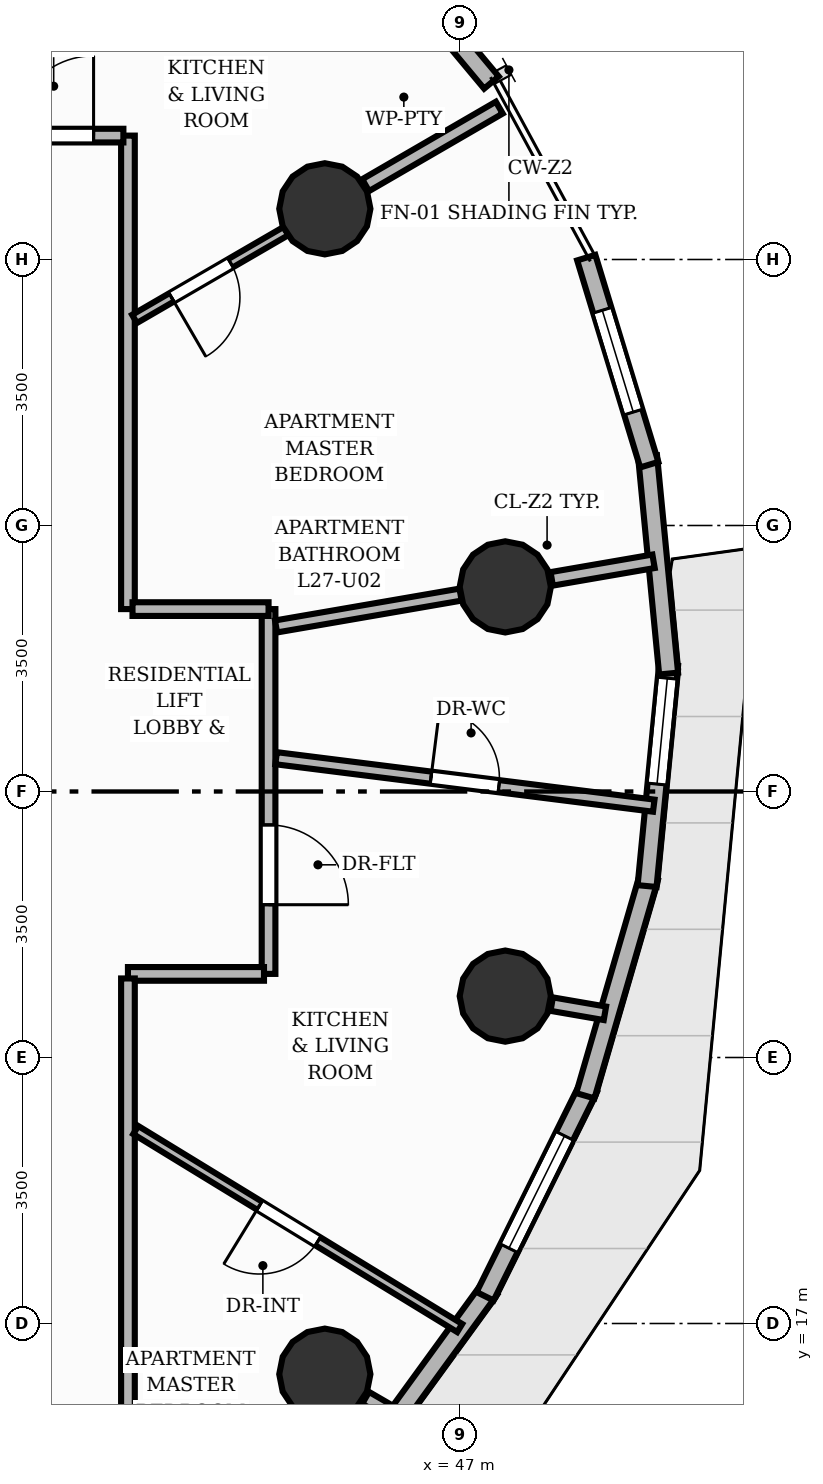
"""IFC4 building model, lengths in metres.
Left out: names, types, materials, properties, quantities, classifications, styles, units other than length and angle.
Written with IfcOpenShell. Run it as: python <this file> out.ifc"""

import sys

from ifc_helpers import new_model, si_unit, direction, frame, frame_2d, origin, origin_2d, place, context, subcontext, project, spatial, rectangle, circle, extrude, element, fill, save


model = new_model("IFC4")
c1 = context("Model", 3, precision=1e-05, world=origin(), true_north=direction((0.0, 1.0)))
c2 = subcontext(c1, "Body", "Model", "MODEL_VIEW")
j1 = project(units=[si_unit("LENGTHUNIT", "METRE"), si_unit("PLANEANGLEUNIT", "RADIAN")], contexts=[c1])
p1 = place(None, origin())
s1 = spatial("IfcSite", under=j1, at=p1, CompositionType="ELEMENT")
p2 = place(p1, origin())
s2 = spatial("IfcBuilding", under=s1, at=p2, CompositionType="ELEMENT")
p3 = place(p2, frame((0.0, 0.0, 93.28)))
s3 = spatial("IfcBuildingStorey", under=s2, at=p3, CompositionType="ELEMENT", Elevation=93.28)
for number, where, z_axis, x_axis in (
    (1, (47.594, 26.692, 0.0), (0.0, 0.0, 1.0), (1.0, 0.0, 0.0)),
    (2, (45.22, 31.667, 0.0), (0.0, 0.0, 1.0), (1.0, 0.0, 0.0)),
    (3, (45.22, 16.333, 0.0), (0.0, 0.0, 1.0), (1.0, 0.0, 0.0)),
    (4, (47.594, 21.308, 0.0), (0.0, 0.0, 1.0), (1.0, 0.0, 0.0)),
):
    element("IfcColumn", number, at=place(p3, frame(where, z_axis=z_axis, x_axis=x_axis)), inside=s3, PredefinedType="COLUMN", context=c2, shape_type="SweptSolid", body=[
        extrude(circle(Radius=0.6, at=origin_2d()), origin(), (0.0, 0.0, 1.0), 3.2),
    ])
p4 = place(p3, frame((45.572, 35.535, 0.0), z_axis=(0.0, 0.0, 1.0), x_axis=(0.640518566271, -0.76794268423, 0.0)))
e5 = element("IfcWall", 5, at=p4, inside=s3, PredefinedType="SOLIDWALL", context=c2, shape_type="SweptSolid", body=[
    extrude(rectangle(XDim=2.874, YDim=0.25, at=frame_2d((1.437, 0.0))), origin(), (0.0, 0.0, 1.0), 2.96),
])
p5 = place(p4, frame((0.612, 0.0, 0.85)))
e6 = element("IfcOpeningElement", 6, at=p5, cuts=e5, PredefinedType="OPENING", context=c2, shape_type="SweptSolid", body=[
    extrude(rectangle(XDim=1.65, YDim=1.55, at=frame_2d((0.825, 0.775))), frame((0.0, 0.135, 0.0), z_axis=(0.0, -1.0, 0.0), x_axis=(1.0, 0.0, 0.0)), (0.0, 0.0, 1.0), 0.27),
])
p6 = place(p3, frame((47.386, 17.453, 0.0), z_axis=(0.0, 0.0, 1.0), x_axis=(-0.588208785685, -0.808709109905, 0.0)))
e7 = element("IfcWall", 7, at=p6, inside=s3, PredefinedType="SOLIDWALL", context=c2, shape_type="SweptSolid", body=[
    extrude(rectangle(XDim=3.131, YDim=0.25, at=frame_2d((1.565, 0.0))), origin(), (0.0, 0.0, 1.0), 2.96),
])
p7 = place(p3, frame((48.688, 20.101, 0.0), z_axis=(0.0, 0.0, 1.0), x_axis=(-0.443988069997, -0.896032696781, 0.0)))
e8 = element("IfcWall", 8, at=p7, inside=s3, PredefinedType="SOLIDWALL", context=c2, shape_type="SweptSolid", body=[
    extrude(rectangle(XDim=3.061, YDim=0.25, at=frame_2d((1.53, 0.0))), origin(), (0.0, 0.0, 1.0), 2.96),
])
p8 = place(p7, frame((0.705, 0.0, 0.85)))
e9 = element("IfcOpeningElement", 9, at=p8, cuts=e8, PredefinedType="OPENING", context=c2, shape_type="SweptSolid", body=[
    extrude(rectangle(XDim=1.65, YDim=1.55, at=frame_2d((0.825, 0.775))), frame((0.0, 0.135, 0.0), z_axis=(0.0, -1.0, 0.0), x_axis=(1.0, 0.0, 0.0)), (0.0, 0.0, 1.0), 0.27),
])
p9 = place(p3, frame((49.481, 22.866, 0.0), z_axis=(0.0, 0.0, 1.0), x_axis=(-0.279152874041, -0.960246672952, 0.0)))
e10 = element("IfcWall", 10, at=p9, inside=s3, PredefinedType="SOLIDWALL", context=c2, shape_type="SweptSolid", body=[
    extrude(rectangle(XDim=2.989, YDim=0.25, at=frame_2d((1.494, 0.0))), origin(), (0.0, 0.0, 1.0), 2.96),
])
p10 = place(p3, frame((49.743, 25.665, 0.0), z_axis=(0.0, 0.0, 1.0), x_axis=(-0.096873982201, -0.995296655059, 0.0)))
e11 = element("IfcWall", 11, at=p10, inside=s3, PredefinedType="SOLIDWALL", context=c2, shape_type="SweptSolid", body=[
    extrude(rectangle(XDim=2.923, YDim=0.25, at=frame_2d((1.462, 0.0))), origin(), (0.0, 0.0, 1.0), 2.96),
])
p11 = place(p10, frame((0.175, 0.0, 0.85)))
e12 = element("IfcOpeningElement", 12, at=p11, cuts=e11, PredefinedType="OPENING", context=c2, shape_type="SweptSolid", body=[
    extrude(rectangle(XDim=1.4, YDim=1.55, at=frame_2d((0.7, 0.775))), frame((0.0, 0.135, 0.0), z_axis=(0.0, -1.0, 0.0), x_axis=(1.0, 0.0, 0.0)), (0.0, 0.0, 1.0), 0.27),
])
p12 = place(p3, frame((49.467, 28.412, 0.0), z_axis=(0.0, 0.0, 1.0), x_axis=(0.096332339466, -0.995349225334, 0.0)))
e13 = element("IfcWall", 13, at=p12, inside=s3, PredefinedType="SOLIDWALL", context=c2, shape_type="SweptSolid", body=[
    extrude(rectangle(XDim=2.874, YDim=0.25, at=frame_2d((1.437, 0.0))), origin(), (0.0, 0.0, 1.0), 2.96),
])
p13 = place(p3, frame((48.66, 31.024, 0.0), z_axis=(0.0, 0.0, 1.0), x_axis=(0.291144558409, -0.956679071637, 0.0)))
e14 = element("IfcWall", 14, at=p13, inside=s3, PredefinedType="SOLIDWALL", context=c2, shape_type="SweptSolid", body=[
    extrude(rectangle(XDim=2.848, YDim=0.25, at=frame_2d((1.424, 0.0))), origin(), (0.0, 0.0, 1.0), 2.96),
])
p14 = place(p13, frame((0.724, 0.0, 0.85)))
e15 = element("IfcOpeningElement", 15, at=p14, cuts=e14, PredefinedType="OPENING", context=c2, shape_type="SweptSolid", body=[
    extrude(rectangle(XDim=1.4, YDim=1.55, at=frame_2d((0.7, 0.775))), frame((0.0, 0.135, 0.0), z_axis=(0.0, -1.0, 0.0), x_axis=(1.0, 0.0, 0.0)), (0.0, 0.0, 1.0), 0.27),
])
p15 = place(p3, frame((48.206, 26.798, 0.0), z_axis=(0.0, 0.0, 1.0), x_axis=(0.98540615772, 0.170219576807, 0.0)))
e16 = element("IfcWall", 16, at=p15, inside=s3, PredefinedType="PARTITIONING", context=c2, shape_type="SweptSolid", body=[
    extrude(rectangle(XDim=1.36, YDim=0.18, at=frame_2d((0.68, 0.0))), origin(), (0.0, 0.0, 1.0), 2.26),
])
p16 = place(p3, frame((45.757, 31.978, 0.0), z_axis=(0.0, 0.0, 1.0), x_axis=(0.865025978628, 0.501727073516, 0.0)))
e17 = element("IfcWall", 17, at=p16, inside=s3, PredefinedType="PARTITIONING", context=c2, shape_type="SweptSolid", body=[
    extrude(rectangle(XDim=2.033, YDim=0.18, at=frame_2d((1.017, 0.0))), origin(), (0.0, 0.0, 1.0), 2.26),
])
p17 = place(p3, frame((45.757, 16.022, 0.0), z_axis=(0.0, 0.0, 1.0), x_axis=(0.864926134071, -0.501899175733, 0.0)))
e18 = element("IfcWall", 18, at=p17, inside=s3, PredefinedType="PARTITIONING", context=c2, shape_type="SweptSolid", body=[
    extrude(rectangle(XDim=0.424, YDim=0.18, at=frame_2d((0.212, 0.0))), origin(), (0.0, 0.0, 1.0), 2.26),
])
p18 = place(p3, frame((48.206, 21.202, 0.0), z_axis=(0.0, 0.0, 1.0), x_axis=(0.985420399327, -0.17013711115, 0.0)))
e19 = element("IfcWall", 19, at=p18, inside=s3, PredefinedType="PARTITIONING", context=c2, shape_type="SweptSolid", body=[
    extrude(rectangle(XDim=0.71, YDim=0.18, at=frame_2d((0.355, 0.0))), origin(), (0.0, 0.0, 1.0), 2.26),
])
p19 = place(p3, frame((44.48, 26.4, 0.0), z_axis=(0.0, 0.0, 1.0), x_axis=(0.0, -1.0, 0.0)))
e20 = element("IfcWall", 20, at=p19, inside=s3, PredefinedType="PARTITIONING", context=c2, shape_type="SweptSolid", body=[
    extrude(rectangle(XDim=4.8, YDim=0.18, at=frame_2d((2.4, 0.0))), origin(), (0.0, 0.0, 1.0), 2.955),
])
p20 = place(p19, frame((2.84, 0.0, 0.0)))
e21 = element("IfcOpeningElement", 21, at=p20, cuts=e20, PredefinedType="OPENING", context=c2, shape_type="SweptSolid", body=[
    extrude(rectangle(XDim=1.05, YDim=2.15, at=frame_2d((0.525, 1.075))), frame((0.0, 0.1, 0.0), z_axis=(0.0, -1.0, 0.0), x_axis=(1.0, 0.0, 0.0)), (0.0, 0.0, 1.0), 0.2),
])
p21 = place(p3, frame((44.42, 21.6, 0.0), z_axis=(0.0, 0.0, 1.0), x_axis=(-1.0, 0.0, 0.0)))
e22 = element("IfcWall", 22, at=p21, inside=s3, PredefinedType="PARTITIONING", context=c2, shape_type="SweptSolid", body=[
    extrude(rectangle(XDim=1.79, YDim=0.18, at=frame_2d((0.895, 0.0))), origin(), (0.0, 0.0, 1.0), 2.26),
])
p22 = place(p3, frame((42.63, 21.54, 0.0), z_axis=(0.0, 0.0, 1.0), x_axis=(0.0, -1.0, 0.0)))
e23 = element("IfcWall", 23, at=p22, inside=s3, PredefinedType="PARTITIONING", context=c2, shape_type="SweptSolid", body=[
    extrude(rectangle(XDim=6.17, YDim=0.18, at=frame_2d((3.085, 0.0))), origin(), (0.0, 0.0, 1.0), 2.955),
])
p23 = place(p3, frame((42.63, 32.63, 0.0), z_axis=(0.0, 0.0, 1.0), x_axis=(0.0, -1.0, 0.0)))
e24 = element("IfcWall", 24, at=p23, inside=s3, PredefinedType="PARTITIONING", context=c2, shape_type="SweptSolid", body=[
    extrude(rectangle(XDim=6.23, YDim=0.18, at=frame_2d((3.115, 0.0))), origin(), (0.0, 0.0, 1.0), 2.955),
])
p24 = place(p3, frame((34.015, 32.63, 0.0), z_axis=(0.0, 0.0, 1.0), x_axis=(1.0, 0.0, 0.0)))
e25 = element("IfcWall", 25, at=p24, inside=s3, PredefinedType="PARTITIONING", context=c2, shape_type="SweptSolid", body=[
    extrude(rectangle(XDim=8.555, YDim=0.18, at=frame_2d((4.277, 0.0))), origin(), (0.0, 0.0, 1.0), 2.955),
])
p25 = place(p24, frame((7.112, 0.0, 0.0)))
e26 = element("IfcOpeningElement", 26, at=p25, cuts=e25, PredefinedType="OPENING", context=c2, shape_type="SweptSolid", body=[
    extrude(rectangle(XDim=1.05, YDim=2.15, at=frame_2d((0.525, 1.075))), frame((0.0, 0.1, 0.0), z_axis=(0.0, -1.0, 0.0), x_axis=(1.0, 0.0, 0.0)), (0.0, 0.0, 1.0), 0.2),
])
p26 = place(p3, frame((42.69, 26.4, 0.0), z_axis=(0.0, 0.0, 1.0), x_axis=(1.0, 0.0, 0.0)))
e27 = element("IfcWall", 27, at=p26, inside=s3, PredefinedType="PARTITIONING", context=c2, shape_type="SweptSolid", body=[
    extrude(rectangle(XDim=1.79, YDim=0.18, at=frame_2d((0.895, 0.0))), origin(), (0.0, 0.0, 1.0), 2.26),
])
p27 = place(p3, frame((44.579, 24.438, 0.0), z_axis=(0.0, 0.0, 1.0), x_axis=(0.99219440442, -0.124700697023, 0.0)))
e28 = element("IfcWall", 28, at=p27, inside=s3, PredefinedType="PLUMBINGWALL", context=c2, shape_type="SweptSolid", body=[
    extrude(rectangle(XDim=5.008, YDim=0.16, at=frame_2d((2.504, 0.0))), origin(), (0.0, 0.0, 1.0), 2.955),
])
p28 = place(p27, frame((2.054, 0.0, 0.0)))
e29 = element("IfcOpeningElement", 29, at=p28, cuts=e28, PredefinedType="OPENING", context=c2, shape_type="SweptSolid", body=[
    extrude(rectangle(XDim=0.9, YDim=2.1, at=frame_2d((0.45, 1.05))), frame((0.0, 0.09, 0.0), z_axis=(0.0, -1.0, 0.0), x_axis=(1.0, 0.0, 0.0)), (0.0, 0.0, 1.0), 0.18),
])
p29 = place(p3, frame((46.995, 16.94, 0.0), z_axis=(0.0, 0.0, 1.0), x_axis=(-0.85322505129, 0.521542914678, 0.0)))
e30 = element("IfcWall", 30, at=p29, inside=s3, PredefinedType="PARTITIONING", context=c2, shape_type="SweptSolid", body=[
    extrude(rectangle(XDim=4.996, YDim=0.125, at=frame_2d((2.498, 0.0))), origin(), (0.0, 0.0, 1.0), 2.641),
])
p30 = place(p29, frame((2.188, 0.0, 0.0)))
e31 = element("IfcOpeningElement", 31, at=p30, cuts=e30, PredefinedType="OPENING", context=c2, shape_type="SweptSolid", body=[
    extrude(rectangle(XDim=0.9, YDim=2.1, at=frame_2d((0.45, 1.05))), frame((0.0, 0.073, 0.0), z_axis=(0.0, -1.0, 0.0), x_axis=(1.0, 0.0, 0.0)), (0.0, 0.0, 1.0), 0.145),
])
p31 = place(p3, frame((44.579, 26.171, 0.0), z_axis=(0.0, 0.0, 1.0), x_axis=(0.985404570769, 0.170228763457, 0.0)))
e32 = element("IfcWall", 32, at=p31, inside=s3, PredefinedType="PLUMBINGWALL", context=c2, shape_type="SweptSolid", body=[
    extrude(rectangle(XDim=2.464, YDim=0.16, at=frame_2d((1.232, 0.0))), origin(), (0.0, 0.0, 1.0), 2.26),
])
p32 = place(p3, frame((39.991, 32.696, 0.0), z_axis=(0.0, 0.0, 1.0), x_axis=(0.750059872717, 0.661369932292, 0.0)))
e33 = element("IfcWall", 33, at=p32, inside=s3, PredefinedType="PLUMBINGWALL", context=c2, shape_type="SweptSolid", body=[
    extrude(rectangle(XDim=5.775, YDim=0.16, at=frame_2d((2.888, 0.0))), origin(), (0.0, 0.0, 1.0), 2.955),
])
p33 = place(p32, frame((3.278, 0.0, 0.0)))
e34 = element("IfcOpeningElement", 34, at=p33, cuts=e33, PredefinedType="OPENING", context=c2, shape_type="SweptSolid", body=[
    extrude(rectangle(XDim=0.9, YDim=2.1, at=frame_2d((0.45, 1.05))), frame((0.0, 0.09, 0.0), z_axis=(0.0, -1.0, 0.0), x_axis=(1.0, 0.0, 0.0)), (0.0, 0.0, 1.0), 0.18),
])
p34 = place(p3, frame((44.711, 31.375, 0.0), z_axis=(0.0, 0.0, 1.0), x_axis=(-0.864966854608, -0.501828995207, 0.0)))
e35 = element("IfcWall", 35, at=p34, inside=s3, PredefinedType="PARTITIONING", context=c2, shape_type="SweptSolid", body=[
    extrude(rectangle(XDim=2.306, YDim=0.125, at=frame_2d((1.153, 0.0))), origin(), (0.0, 0.0, 1.0), 2.26),
])
p35 = place(p34, frame((0.843, 0.0, 0.0)))
e36 = element("IfcOpeningElement", 36, at=p35, cuts=e35, PredefinedType="OPENING", context=c2, shape_type="SweptSolid", body=[
    extrude(rectangle(XDim=0.9, YDim=2.1, at=frame_2d((0.45, 1.05))), frame((0.0, 0.073, 0.0), z_axis=(0.0, -1.0, 0.0), x_axis=(1.0, 0.0, 0.0)), (0.0, 0.0, 1.0), 0.145),
])
p36 = place(p8, origin())
e37 = element("IfcWindow", 37, at=p36, inside=s3, PartitioningType="SINGLE_PANEL", PredefinedType="WINDOW", context=c2, shape_type="SweptSolid", body=[
    extrude(rectangle(XDim=1.65, YDim=1.55, at=frame_2d((0.825, 0.775))), frame((0.0, 0.03, 0.0), z_axis=(0.0, -1.0, 0.0), x_axis=(1.0, 0.0, 0.0)), (0.0, 0.0, 1.0), 0.06),
])
fill(e9, e37)
p37 = place(p11, origin())
e38 = element("IfcWindow", 38, at=p37, inside=s3, PartitioningType="SINGLE_PANEL", PredefinedType="WINDOW", context=c2, shape_type="SweptSolid", body=[
    extrude(rectangle(XDim=1.4, YDim=1.55, at=frame_2d((0.7, 0.775))), frame((0.0, 0.03, 0.0), z_axis=(0.0, -1.0, 0.0), x_axis=(1.0, 0.0, 0.0)), (0.0, 0.0, 1.0), 0.06),
])
fill(e12, e38)
p38 = place(p14, origin())
e39 = element("IfcWindow", 39, at=p38, inside=s3, PartitioningType="SINGLE_PANEL", PredefinedType="WINDOW", context=c2, shape_type="SweptSolid", body=[
    extrude(rectangle(XDim=1.4, YDim=1.55, at=frame_2d((0.7, 0.775))), frame((0.0, 0.03, 0.0), z_axis=(0.0, -1.0, 0.0), x_axis=(1.0, 0.0, 0.0)), (0.0, 0.0, 1.0), 0.06),
])
fill(e15, e39)
p39 = place(p20, origin())
e40 = element("IfcDoor", 40, at=p39, inside=s3, OperationType="SINGLE_SWING_RIGHT", PredefinedType="DOOR", context=c2, shape_type="SweptSolid", body=[
    extrude(rectangle(XDim=1.05, YDim=2.15, at=frame_2d((0.525, 1.075))), frame((0.0, 0.025, 0.0), z_axis=(0.0, -1.0, 0.0), x_axis=(1.0, 0.0, 0.0)), (0.0, 0.0, 1.0), 0.05),
])
fill(e21, e40)
p40 = place(p28, origin())
e41 = element("IfcDoor", 41, at=p40, inside=s3, OperationType="SINGLE_SWING_LEFT", PredefinedType="DOOR", context=c2, shape_type="SweptSolid", body=[
    extrude(rectangle(XDim=0.9, YDim=2.1, at=frame_2d((0.45, 1.05))), frame((0.0, 0.025, 0.0), z_axis=(0.0, -1.0, 0.0), x_axis=(1.0, 0.0, 0.0)), (0.0, 0.0, 1.0), 0.05),
])
fill(e29, e41)
p41 = place(p30, origin())
e42 = element("IfcDoor", 42, at=p41, inside=s3, OperationType="SINGLE_SWING_RIGHT", PredefinedType="DOOR", context=c2, shape_type="SweptSolid", body=[
    extrude(rectangle(XDim=0.9, YDim=2.1, at=frame_2d((0.45, 1.05))), frame((0.0, 0.025, 0.0), z_axis=(0.0, -1.0, 0.0), x_axis=(1.0, 0.0, 0.0)), (0.0, 0.0, 1.0), 0.05),
])
fill(e31, e42)
p42 = place(p25, origin())
e43 = element("IfcDoor", 43, at=p42, inside=s3, OperationType="SINGLE_SWING_RIGHT", PredefinedType="DOOR", context=c2, shape_type="SweptSolid", body=[
    extrude(rectangle(XDim=1.05, YDim=2.15, at=frame_2d((0.525, 1.075))), frame((0.0, 0.025, 0.0), z_axis=(0.0, -1.0, 0.0), x_axis=(1.0, 0.0, 0.0)), (0.0, 0.0, 1.0), 0.05),
])
fill(e26, e43)
p43 = place(p35, origin())
e44 = element("IfcDoor", 44, at=p43, inside=s3, OperationType="SINGLE_SWING_RIGHT", PredefinedType="DOOR", context=c2, shape_type="SweptSolid", body=[
    extrude(rectangle(XDim=0.9, YDim=2.1, at=frame_2d((0.45, 1.05))), frame((0.0, 0.025, 0.0), z_axis=(0.0, -1.0, 0.0), x_axis=(1.0, 0.0, 0.0)), (0.0, 0.0, 1.0), 0.05),
])
fill(e36, e44)
save(model, sys.argv[1])
